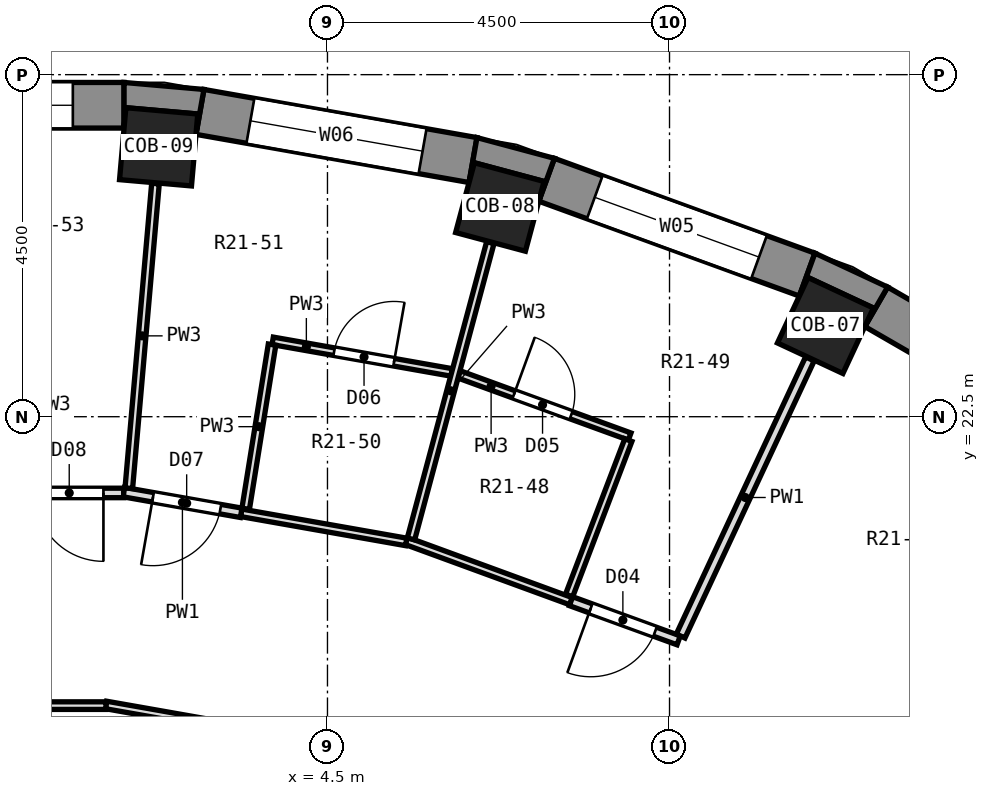
"""IFC4 building model, lengths in metres.
Left out: names, types, materials, properties, quantities, classifications, styles, units other than length and angle.
Written with IfcOpenShell. Run it as: python <this file> out.ifc"""

import sys

from ifc_helpers import new_model, si_unit, direction, frame, frame_2d, origin, origin_2d, place, context, subcontext, project, spatial, polyline, rectangle, outline, extrude, element, fill, save


model = new_model("IFC4")
c1 = context("Model", 3, precision=1e-05, world=origin(), true_north=direction((0.0, 1.0)))
c2 = subcontext(c1, "Body", "Model", "MODEL_VIEW")
j1 = project(units=[si_unit("LENGTHUNIT", "METRE"), si_unit("PLANEANGLEUNIT", "RADIAN")], contexts=[c1])
p1 = place(None, origin())
s1 = spatial("IfcSite", under=j1, at=p1, CompositionType="ELEMENT")
p2 = place(p1, origin())
s2 = spatial("IfcBuilding", under=s1, at=p2, CompositionType="ELEMENT")
p3 = place(p2, frame((0.0, 0.0, 131.5)))
s3 = spatial("IfcBuildingStorey", under=s2, at=p3, CompositionType="ELEMENT", Elevation=131.5)
for number, where, z_axis, x_axis in (
    (1, (11.052, 23.7, 0.0), (0.0, 0.0, 1.0), (0.423, 0.906, 0.0)),
    (2, (6.768, 25.259, 0.0), (0.0, 0.0, 1.0), (0.259, 0.966, 0.0)),
    (3, (2.279, 26.051, 0.0), (0.0, 0.0, 1.0), (0.087, 0.996, 0.0)),
):
    element("IfcColumn", number, at=place(p3, frame(where, z_axis=z_axis, x_axis=x_axis)), inside=s3, PredefinedType="COLUMN", context=c2, shape_type="SweptSolid", body=[
        extrude(rectangle(XDim=0.95, YDim=0.95, at=origin_2d()), origin(), (0.0, 0.0, 1.0), 3.3),
    ])
p4 = place(p3, frame((14.878, 22.122, 0.0), z_axis=(0.0, 0.0, 1.0), x_axis=(-0.866051847062, 0.499954196102, 0.0)))
e4 = element("IfcWall", 4, at=p4, inside=s3, PredefinedType="SOLIDWALL", context=c2, shape_type="SweptSolid", body=[
    extrude(rectangle(XDim=3.648, YDim=0.6, at=frame_2d((1.824, 0.0))), origin(), (0.0, 0.0, 1.0), 2.8),
])
p5 = place(p4, frame((0.674, 0.0, 0.9)))
e5 = element("IfcOpeningElement", 5, at=p5, cuts=e4, PredefinedType="OPENING", context=c2, shape_type="SweptSolid", body=[
    extrude(rectangle(XDim=2.3, YDim=1.8, at=frame_2d((1.15, 0.9))), frame((0.0, 0.312, 0.0), z_axis=(0.0, -1.0, 0.0), x_axis=(1.0, 0.0, 0.0)), (0.0, 0.0, 1.0), 0.624),
])
p6 = place(p3, frame((10.811, 24.369, 0.0), z_axis=(0.0, 0.0, 1.0), x_axis=(-0.939703505393, 0.341990236633, 0.0)))
e6 = element("IfcWall", 6, at=p6, inside=s3, PredefinedType="SOLIDWALL", context=c2, shape_type="SweptSolid", body=[
    extrude(rectangle(XDim=3.648, YDim=0.6, at=frame_2d((1.824, 0.0))), origin(), (0.0, 0.0, 1.0), 2.8),
])
p7 = place(p6, frame((0.674, 0.0, 0.9)))
e7 = element("IfcOpeningElement", 7, at=p7, cuts=e6, PredefinedType="OPENING", context=c2, shape_type="SweptSolid", body=[
    extrude(rectangle(XDim=2.3, YDim=1.8, at=frame_2d((1.15, 0.9))), frame((0.0, 0.312, 0.0), z_axis=(0.0, -1.0, 0.0), x_axis=(1.0, 0.0, 0.0)), (0.0, 0.0, 1.0), 0.624),
])
p8 = place(p3, frame((6.415, 25.876, 0.0), z_axis=(0.0, 0.0, 1.0), x_axis=(-0.984803764455, 0.173670796382, 0.0)))
e8 = element("IfcWall", 8, at=p8, inside=s3, PredefinedType="SOLIDWALL", context=c2, shape_type="SweptSolid", body=[
    extrude(rectangle(XDim=3.648, YDim=0.6, at=frame_2d((1.824, 0.0))), origin(), (0.0, 0.0, 1.0), 2.8),
])
p9 = place(p8, frame((0.674, 0.0, 0.9)))
e9 = element("IfcOpeningElement", 9, at=p9, cuts=e8, PredefinedType="OPENING", context=c2, shape_type="SweptSolid", body=[
    extrude(rectangle(XDim=2.3, YDim=1.8, at=frame_2d((1.15, 0.9))), frame((0.0, 0.312, 0.0), z_axis=(0.0, -1.0, 0.0), x_axis=(1.0, 0.0, 0.0)), (0.0, 0.0, 1.0), 0.624),
])
p10 = place(p3, frame((1.824, 26.597, 0.0), z_axis=(0.0, 0.0, 1.0), x_axis=(-1.0, 0.0, 0.0)))
e10 = element("IfcWall", 10, at=p10, inside=s3, PredefinedType="SOLIDWALL", context=c2, shape_type="SweptSolid", body=[
    extrude(rectangle(XDim=3.648, YDim=0.6, at=frame_2d((1.824, 0.0))), origin(), (0.0, 0.0, 1.0), 2.8),
])
p11 = place(p10, frame((0.674, 0.0, 0.9)))
e11 = element("IfcOpeningElement", 11, at=p11, cuts=e10, PredefinedType="OPENING", context=c2, shape_type="SweptSolid", body=[
    extrude(rectangle(XDim=2.3, YDim=1.8, at=frame_2d((1.15, 0.9))), frame((0.0, 0.312, 0.0), z_axis=(0.0, -1.0, 0.0), x_axis=(1.0, 0.0, 0.0)), (0.0, 0.0, 1.0), 0.624),
])
p12 = place(p3, origin())
e12 = element("IfcWall", 12, at=p12, inside=s3, PredefinedType="SOLIDWALL", context=c2, shape_type="SweptSolid", body=[
    extrude(outline(polyline([(10.913, 24.651), (10.708, 24.087), (10.822, 24.331), (11.683, 23.93), (11.569, 23.686), (11.869, 24.206), (10.913, 24.651)])), origin(), (0.0, 0.0, 1.0), 2.8),
])
p13 = place(p3, origin())
e13 = element("IfcWall", 13, at=p13, inside=s3, PredefinedType="SOLIDWALL", context=c2, shape_type="SweptSolid", body=[
    extrude(outline(polyline([(7.486, 25.899), (6.467, 26.172), (6.363, 25.581), (6.432, 25.841), (7.35, 25.595), (7.28, 25.335), (7.486, 25.899)])), origin(), (0.0, 0.0, 1.0), 2.8),
])
p14 = place(p3, origin())
e14 = element("IfcWall", 14, at=p14, inside=s3, PredefinedType="SOLIDWALL", context=c2, shape_type="SweptSolid", body=[
    extrude(outline(polyline([(2.875, 26.805), (1.824, 26.897), (1.824, 26.297), (1.847, 26.565), (2.794, 26.482), (2.77, 26.215), (2.875, 26.805)])), origin(), (0.0, 0.0, 1.0), 2.8),
])
p15 = place(p3, frame((5.538, 20.866, 0.0), z_axis=(0.0, 0.0, 1.0), x_axis=(0.939002837997, -0.343909392476, 0.0)))
e15 = element("IfcWall", 15, at=p15, inside=s3, PredefinedType="PARTITIONING", context=c2, shape_type="SweptSolid", body=[
    extrude(rectangle(XDim=2.306, YDim=0.1, at=frame_2d((1.153, 0.0))), origin(), (0.0, 0.0, 1.0), 2.8),
])
p16 = place(p3, frame((7.704, 20.073, 0.0), z_axis=(0.0, 0.0, 1.0), x_axis=(0.939798154323, -0.341730053012, 0.0)))
e16 = element("IfcWall", 16, at=p16, inside=s3, PredefinedType="PARTITIONING", context=c2, shape_type="SweptSolid", body=[
    extrude(rectangle(XDim=1.507, YDim=0.125, at=frame_2d((0.753, 0.0))), origin(), (0.0, 0.0, 1.0), 2.8),
])
p17 = place(p16, frame((0.276, 0.0, 0.0)))
e17 = element("IfcOpeningElement", 17, at=p17, cuts=e16, PredefinedType="OPENING", context=c2, shape_type="SweptSolid", body=[
    extrude(rectangle(XDim=0.9, YDim=2.1, at=frame_2d((0.45, 1.05))), frame((0.0, 0.074, 0.0), z_axis=(0.0, -1.0, 0.0), x_axis=(1.0, 0.0, 0.0)), (0.0, 0.0, 1.0), 0.149),
])
p18 = place(p3, frame((6.23, 23.057, 0.0), z_axis=(0.0, 0.0, 1.0), x_axis=(0.939644231496, -0.342153062556, 0.0)))
e18 = element("IfcWall", 18, at=p18, inside=s3, PredefinedType="PARTITIONING", context=c2, shape_type="SweptSolid", body=[
    extrude(rectangle(XDim=2.39, YDim=0.1, at=frame_2d((1.195, 0.0))), origin(), (0.0, 0.0, 1.0), 2.8),
])
p19 = place(p18, frame((0.77, 0.0, 0.0)))
e19 = element("IfcOpeningElement", 19, at=p19, cuts=e18, PredefinedType="OPENING", context=c2, shape_type="SweptSolid", body=[
    extrude(rectangle(XDim=0.8, YDim=2.1, at=frame_2d((0.4, 1.05))), frame((0.0, 0.062, 0.0), z_axis=(0.0, -1.0, 0.0), x_axis=(1.0, 0.0, 0.0)), (0.0, 0.0, 1.0), 0.124),
])
p20 = place(p3, frame((1.586, 18.708, 0.0), z_axis=(0.0, 0.0, 1.0), x_axis=(0.984816586048, -0.17359807558, 0.0)))
e20 = element("IfcWall", 20, at=p20, inside=s3, PredefinedType="PARTITIONING", context=c2, shape_type="SweptSolid", body=[
    extrude(rectangle(XDim=3.273, YDim=0.1, at=frame_2d((1.636, 0.0))), origin(), (0.0, 0.0, 1.0), 2.8),
])
p21 = place(p3, frame((3.365, 21.236, 0.0), z_axis=(0.0, 0.0, 1.0), x_axis=(0.98480584975, -0.173658971256, 0.0)))
e21 = element("IfcWall", 21, at=p21, inside=s3, PredefinedType="PARTITIONING", context=c2, shape_type="SweptSolid", body=[
    extrude(rectangle(XDim=2.204, YDim=0.1, at=frame_2d((1.102, 0.0))), origin(), (0.0, 0.0, 1.0), 2.8),
])
p22 = place(p3, frame((1.819, 21.508, 0.0), z_axis=(0.0, 0.0, 1.0), x_axis=(0.984825798369, -0.17354580625, 0.0)))
e22 = element("IfcWall", 22, at=p22, inside=s3, PredefinedType="PARTITIONING", context=c2, shape_type="SweptSolid", body=[
    extrude(rectangle(XDim=1.57, YDim=0.125, at=frame_2d((0.785, 0.0))), origin(), (0.0, 0.0, 1.0), 2.8),
])
p23 = place(p22, frame((0.392, 0.0, 0.0)))
e23 = element("IfcOpeningElement", 23, at=p23, cuts=e22, PredefinedType="OPENING", context=c2, shape_type="SweptSolid", body=[
    extrude(rectangle(XDim=0.9, YDim=2.1, at=frame_2d((0.45, 1.05))), frame((0.0, 0.074, 0.0), z_axis=(0.0, -1.0, 0.0), x_axis=(1.0, 0.0, 0.0)), (0.0, 0.0, 1.0), 0.149),
])
p24 = place(p3, frame((3.779, 23.498, 0.0), z_axis=(0.0, 0.0, 1.0), x_axis=(0.984802055472, -0.173680486922, 0.0)))
e24 = element("IfcWall", 24, at=p24, inside=s3, PredefinedType="PARTITIONING", context=c2, shape_type="SweptSolid", body=[
    extrude(rectangle(XDim=2.391, YDim=0.1, at=frame_2d((1.196, 0.0))), origin(), (0.0, 0.0, 1.0), 2.8),
])
p25 = place(p24, frame((0.821, 0.0, 0.0)))
e25 = element("IfcOpeningElement", 25, at=p25, cuts=e24, PredefinedType="OPENING", context=c2, shape_type="SweptSolid", body=[
    extrude(rectangle(XDim=0.8, YDim=2.1, at=frame_2d((0.4, 1.05))), frame((0.0, 0.062, 0.0), z_axis=(0.0, -1.0, 0.0), x_axis=(1.0, 0.0, 0.0)), (0.0, 0.0, 1.0), 0.124),
])
p26 = place(p3, frame((-1.687, 18.699, 0.0), z_axis=(0.0, 0.0, 1.0), x_axis=(1.0, 0.0, 0.0)))
e26 = element("IfcWall", 26, at=p26, inside=s3, PredefinedType="PARTITIONING", context=c2, shape_type="SweptSolid", body=[
    extrude(rectangle(XDim=3.273, YDim=0.1, at=frame_2d((1.636, 0.0))), origin(), (0.0, 0.0, 1.0), 2.8),
])
p27 = place(p26, frame((1.237, 0.0, 0.0)))
e27 = element("IfcOpeningElement", 27, at=p27, cuts=e26, PredefinedType="OPENING", context=c2, shape_type="SweptSolid", body=[
    extrude(rectangle(XDim=0.9, YDim=2.1, at=frame_2d((0.45, 1.05))), frame((0.0, 0.062, 0.0), z_axis=(0.0, -1.0, 0.0), x_axis=(1.0, 0.0, 0.0)), (0.0, 0.0, 1.0), 0.124),
])
p28 = place(p3, frame((0.374, 21.497, 0.0), z_axis=(0.0, 0.0, 1.0), x_axis=(1.0, 0.0, 0.0)))
e28 = element("IfcWall", 28, at=p28, inside=s3, PredefinedType="PARTITIONING", context=c2, shape_type="SweptSolid", body=[
    extrude(rectangle(XDim=1.445, YDim=0.125, at=frame_2d((0.722, 0.0))), origin(), (0.0, 0.0, 1.0), 2.8),
])
p29 = place(p28, frame((0.279, 0.0, 0.0)))
e29 = element("IfcOpeningElement", 29, at=p29, cuts=e28, PredefinedType="OPENING", context=c2, shape_type="SweptSolid", body=[
    extrude(rectangle(XDim=0.9, YDim=2.1, at=frame_2d((0.45, 1.05))), frame((0.0, 0.074, 0.0), z_axis=(0.0, -1.0, 0.0), x_axis=(1.0, 0.0, 0.0)), (0.0, 0.0, 1.0), 0.149),
])
p30 = place(p3, frame((10.795, 15.417, 0.0), z_axis=(0.0, 0.0, 1.0), x_axis=(0.573553308079, 0.819168238393, 0.0)))
e30 = element("IfcWall", 30, at=p30, inside=s3, PredefinedType="PARTITIONING", context=c2, shape_type="SweptSolid", body=[
    extrude(rectangle(XDim=6.845, YDim=0.1, at=frame_2d((3.422, 0.0))), origin(), (0.0, 0.0, 1.0), 2.8),
])
p31 = place(p30, frame((3.315, 0.0, 0.0)))
e31 = element("IfcOpeningElement", 31, at=p31, cuts=e30, PredefinedType="OPENING", context=c2, shape_type="SweptSolid", body=[
    extrude(rectangle(XDim=0.9, YDim=2.1, at=frame_2d((0.45, 1.05))), frame((0.0, 0.062, 0.0), z_axis=(0.0, -1.0, 0.0), x_axis=(1.0, 0.0, 0.0)), (0.0, 0.0, 1.0), 0.124),
])
p32 = place(p3, frame((9.146, 19.615, 0.0), z_axis=(0.0, 0.0, 1.0), x_axis=(0.422622950513, 0.906305600612, 0.0)))
e32 = element("IfcWall", 32, at=p32, inside=s3, PredefinedType="PARTITIONING", context=c2, shape_type="SweptSolid", body=[
    extrude(rectangle(XDim=4.022, YDim=0.125, at=frame_2d((2.011, 0.0))), origin(), (0.0, 0.0, 1.0), 2.8),
])
p33 = place(p3, frame((7.679, 20.148, 0.0), z_axis=(0.0, 0.0, 1.0), x_axis=(0.35615776917, 0.934425836255, 0.0)))
e33 = element("IfcWall", 33, at=p33, inside=s3, PredefinedType="PARTITIONING", context=c2, shape_type="SweptSolid", body=[
    extrude(rectangle(XDim=2.188, YDim=0.1, at=frame_2d((1.094, 0.0))), origin(), (0.0, 0.0, 1.0), 2.8),
])
p34 = place(p3, frame((5.599, 20.892, 0.0), z_axis=(0.0, 0.0, 1.0), x_axis=(0.258615129659, 0.965980442199, 0.0)))
e34 = element("IfcWall", 34, at=p34, inside=s3, PredefinedType="PARTITIONING", context=c2, shape_type="SweptSolid", body=[
    extrude(rectangle(XDim=4.036, YDim=0.1, at=frame_2d((2.018, 0.0))), origin(), (0.0, 0.0, 1.0), 2.8),
])
p35 = place(p3, frame((3.424, 21.289, 0.0), z_axis=(0.0, 0.0, 1.0), x_axis=(0.158695579516, 0.987327561168, 0.0)))
e35 = element("IfcWall", 35, at=p35, inside=s3, PredefinedType="PARTITIONING", context=c2, shape_type="SweptSolid", body=[
    extrude(rectangle(XDim=2.188, YDim=0.1, at=frame_2d((1.094, 0.0))), origin(), (0.0, 0.0, 1.0), 2.8),
])
p36 = place(p3, frame((1.886, 21.559, 0.0), z_axis=(0.0, 0.0, 1.0), x_axis=(0.087137593131, 0.996196285811, 0.0)))
e36 = element("IfcWall", 36, at=p36, inside=s3, PredefinedType="PARTITIONING", context=c2, shape_type="SweptSolid", body=[
    extrude(rectangle(XDim=4.023, YDim=0.1, at=frame_2d((2.012, 0.0))), origin(), (0.0, 0.0, 1.0), 2.8),
])
p37 = place(p7, origin())
e37 = element("IfcWindow", 37, at=p37, inside=s3, PartitioningType="SINGLE_PANEL", PredefinedType="WINDOW", context=c2, shape_type="SweptSolid", body=[
    extrude(rectangle(XDim=2.3, YDim=1.8, at=frame_2d((1.15, 0.9))), frame((0.0, 0.18, 0.0), z_axis=(0.0, -1.0, 0.0), x_axis=(1.0, 0.0, 0.0)), (0.0, 0.0, 1.0), 0.06),
])
fill(e7, e37)
p38 = place(p9, origin())
e38 = element("IfcWindow", 38, at=p38, inside=s3, PartitioningType="SINGLE_PANEL", PredefinedType="WINDOW", context=c2, shape_type="SweptSolid", body=[
    extrude(rectangle(XDim=2.3, YDim=1.8, at=frame_2d((1.15, 0.9))), frame((0.0, 0.18, 0.0), z_axis=(0.0, -1.0, 0.0), x_axis=(1.0, 0.0, 0.0)), (0.0, 0.0, 1.0), 0.06),
])
fill(e9, e38)
p39 = place(p11, origin())
e39 = element("IfcWindow", 39, at=p39, inside=s3, PartitioningType="SINGLE_PANEL", PredefinedType="WINDOW", context=c2, shape_type="SweptSolid", body=[
    extrude(rectangle(XDim=2.3, YDim=1.8, at=frame_2d((1.15, 0.9))), frame((0.0, 0.18, 0.0), z_axis=(0.0, -1.0, 0.0), x_axis=(1.0, 0.0, 0.0)), (0.0, 0.0, 1.0), 0.06),
])
fill(e11, e39)
p40 = place(p17, frame((0.9, 0.0, 0.0), z_axis=(0.0, 0.0, 1.0), x_axis=(-1.0, 0.0, 0.0)))
e40 = element("IfcDoor", 40, at=p40, inside=s3, OperationType="SINGLE_SWING_RIGHT", PredefinedType="DOOR", context=c2, shape_type="SweptSolid", body=[
    extrude(rectangle(XDim=0.9, YDim=2.1, at=frame_2d((0.45, 1.05))), frame((0.0, 0.025, 0.0), z_axis=(0.0, -1.0, 0.0), x_axis=(1.0, 0.0, 0.0)), (0.0, 0.0, 1.0), 0.05),
])
fill(e17, e40)
p41 = place(p19, origin())
e41 = element("IfcDoor", 41, at=p41, inside=s3, OperationType="SINGLE_SWING_LEFT", PredefinedType="DOOR", context=c2, shape_type="SweptSolid", body=[
    extrude(rectangle(XDim=0.8, YDim=2.1, at=frame_2d((0.4, 1.05))), frame((0.0, 0.025, 0.0), z_axis=(0.0, -1.0, 0.0), x_axis=(1.0, 0.0, 0.0)), (0.0, 0.0, 1.0), 0.05),
])
fill(e19, e41)
p42 = place(p25, origin())
e42 = element("IfcDoor", 42, at=p42, inside=s3, OperationType="SINGLE_SWING_RIGHT", PredefinedType="DOOR", context=c2, shape_type="SweptSolid", body=[
    extrude(rectangle(XDim=0.8, YDim=2.1, at=frame_2d((0.4, 1.05))), frame((0.0, 0.025, 0.0), z_axis=(0.0, -1.0, 0.0), x_axis=(1.0, 0.0, 0.0)), (0.0, 0.0, 1.0), 0.05),
])
fill(e25, e42)
p43 = place(p23, frame((0.9, 0.0, 0.0), z_axis=(0.0, 0.0, 1.0), x_axis=(-1.0, 0.0, 0.0)))
e43 = element("IfcDoor", 43, at=p43, inside=s3, OperationType="SINGLE_SWING_RIGHT", PredefinedType="DOOR", context=c2, shape_type="SweptSolid", body=[
    extrude(rectangle(XDim=0.9, YDim=2.1, at=frame_2d((0.45, 1.05))), frame((0.0, 0.025, 0.0), z_axis=(0.0, -1.0, 0.0), x_axis=(1.0, 0.0, 0.0)), (0.0, 0.0, 1.0), 0.05),
])
fill(e23, e43)
p44 = place(p29, frame((0.9, 0.0, 0.0), z_axis=(0.0, 0.0, 1.0), x_axis=(-1.0, 0.0, 0.0)))
e44 = element("IfcDoor", 44, at=p44, inside=s3, OperationType="SINGLE_SWING_LEFT", PredefinedType="DOOR", context=c2, shape_type="SweptSolid", body=[
    extrude(rectangle(XDim=0.9, YDim=2.1, at=frame_2d((0.45, 1.05))), frame((0.0, 0.025, 0.0), z_axis=(0.0, -1.0, 0.0), x_axis=(1.0, 0.0, 0.0)), (0.0, 0.0, 1.0), 0.05),
])
fill(e29, e44)
save(model, sys.argv[1])
